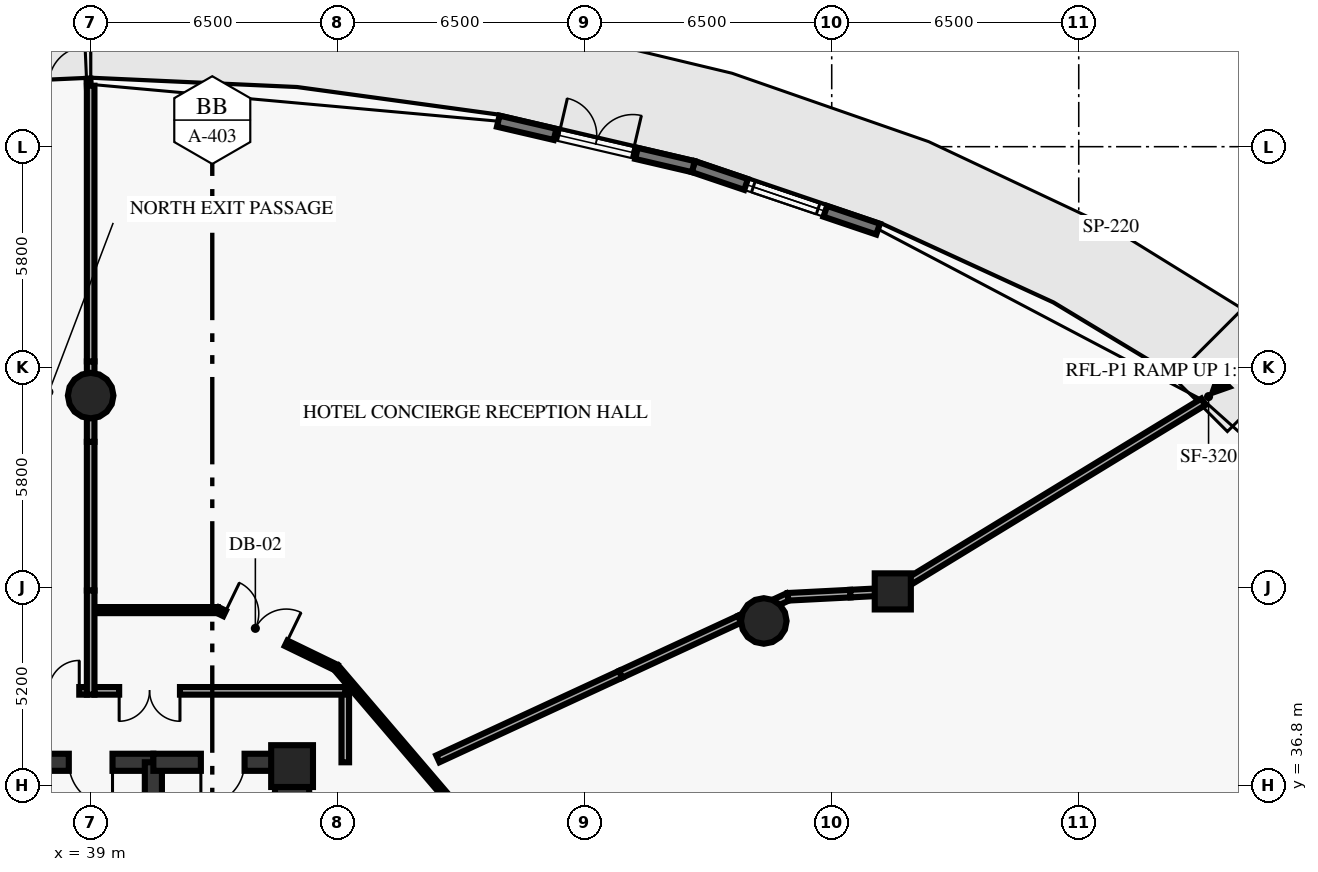
"""IFC4 building model, lengths in metres.
Left out: names, types, materials, properties, quantities, classifications, styles, units other than length and angle.
Written with IfcOpenShell. Run it as: python <this file> out.ifc"""

import sys

from ifc_helpers import new_model, si_unit, direction, frame, frame_2d, origin, origin_2d, place, context, subcontext, project, spatial, rectangle, circle, extrude, element, fill, save


model = new_model("IFC4")
c1 = context("Model", 3, precision=1e-05, world=origin(), true_north=direction((0.0, 1.0)))
c2 = subcontext(c1, "Body", "Model", "MODEL_VIEW")
j1 = project(units=[si_unit("LENGTHUNIT", "METRE"), si_unit("PLANEANGLEUNIT", "RADIAN")], contexts=[c1])
p1 = place(None, origin())
s1 = spatial("IfcSite", under=j1, at=p1, CompositionType="ELEMENT")
p2 = place(p1, origin())
s2 = spatial("IfcBuilding", under=s1, at=p2, CompositionType="ELEMENT")
p3 = place(p2, origin())
s3 = spatial("IfcBuildingStorey", under=s2, at=p3, CompositionType="ELEMENT", Elevation=0.0)
p4 = place(p3, frame((44.3, 37.3, 0.0), z_axis=(0.0, 0.0, 1.0), x_axis=(1.0, 0.0, 0.0)))
e1 = element("IfcColumn", 1, at=p4, inside=s3, PredefinedType="PILASTER", context=c2, shape_type="SweptSolid", body=[
    extrude(rectangle(XDim=1.1, YDim=1.1, at=origin_2d()), origin(), (0.0, 0.0, 1.0), 5.7),
])
for number, where, z_axis, x_axis in (
    (2, (56.713, 41.119, 0.0), (0.0, 0.0, 1.0), (1.0, 0.0, 0.0)),
    (3, (39.0, 47.05, 0.0), (0.0, 0.0, 1.0), (1.0, 0.0, 0.0)),
):
    element("IfcColumn", number, at=place(p3, frame(where, z_axis=z_axis, x_axis=x_axis)), inside=s3, PredefinedType="COLUMN", context=c2, shape_type="SweptSolid", body=[
        extrude(circle(Radius=0.6, at=origin_2d()), origin(), (0.0, 0.0, 1.0), 5.7),
    ])
p5 = place(p3, frame((60.107, 41.897, 0.0), z_axis=(0.0, 0.0, 1.0), x_axis=(1.0, 0.0, 0.0)))
e4 = element("IfcColumn", 4, at=p5, inside=s3, PredefinedType="COLUMN", context=c2, shape_type="SweptSolid", body=[
    extrude(rectangle(XDim=0.95, YDim=0.95, at=origin_2d()), origin(), (0.0, 0.0, 1.0), 5.7),
])
p6 = place(p3, frame((44.3, 29.05, 0.0), z_axis=(0.0, 0.0, 1.0), x_axis=(0.0, 1.0, 0.0)))
e5 = element("IfcWall", 5, at=p6, inside=s3, PredefinedType="SHEAR", context=c2, shape_type="SweptSolid", body=[
    extrude(rectangle(XDim=8.35, YDim=0.9, at=frame_2d((4.175, 0.0))), origin(), (0.0, 0.0, 1.0), 5.7),
])
p7 = place(p3, frame((54.858, 53.075, 0.0), z_axis=(0.0, 0.0, 1.0), x_axis=(0.947251518608, -0.320491123895, 0.0)))
e6 = element("IfcWall", 6, at=p7, inside=s3, PredefinedType="STANDARD", context=c2, shape_type="SweptSolid", body=[
    extrude(rectangle(XDim=5.133, YDim=0.3, at=frame_2d((2.566, 0.0))), origin(), (0.0, 0.0, 1.0), 5.7),
])
p8 = place(p7, frame((1.666, 0.0, 0.9)))
e7 = element("IfcOpeningElement", 7, at=p8, cuts=e6, PredefinedType="OPENING", context=c2, shape_type="SweptSolid", body=[
    extrude(rectangle(XDim=1.8, YDim=2.4, at=frame_2d((0.9, 1.2))), frame((0.0, 0.16, 0.0), z_axis=(0.0, -1.0, 0.0), x_axis=(1.0, 0.0, 0.0)), (0.0, 0.0, 1.0), 0.32),
])
p9 = place(p7, frame((1.466, 0.0, 3.4)))
e8 = element("IfcOpeningElement", 8, at=p9, cuts=e6, PredefinedType="OPENING", context=c2, shape_type="SweptSolid", body=[
    extrude(rectangle(XDim=2.2, YDim=1.3, at=frame_2d((1.1, 0.65))), frame((0.0, 0.16, 0.0), z_axis=(0.0, -1.0, 0.0), x_axis=(1.0, 0.0, 0.0)), (0.0, 0.0, 1.0), 0.32),
])
p10 = place(p3, frame((49.725, 54.271, 0.0), z_axis=(0.0, 0.0, 1.0), x_axis=(0.973908821588, -0.226939655487, 0.0)))
e9 = element("IfcWall", 9, at=p10, inside=s3, PredefinedType="STANDARD", context=c2, shape_type="SweptSolid", body=[
    extrude(rectangle(XDim=5.27, YDim=0.3, at=frame_2d((2.635, 0.0))), origin(), (0.0, 0.0, 1.0), 5.7),
])
p11 = place(p10, frame((1.635, 0.0, 0.0)))
e10 = element("IfcOpeningElement", 10, at=p11, cuts=e9, PredefinedType="OPENING", context=c2, shape_type="SweptSolid", body=[
    extrude(rectangle(XDim=2.0, YDim=2.4, at=frame_2d((1.0, 1.2))), frame((0.0, 0.16, 0.0), z_axis=(0.0, -1.0, 0.0), x_axis=(1.0, 0.0, 0.0)), (0.0, 0.0, 1.0), 0.32),
])
p12 = place(p10, frame((1.535, 0.0, 3.4)))
e11 = element("IfcOpeningElement", 11, at=p12, cuts=e9, PredefinedType="OPENING", context=c2, shape_type="SweptSolid", body=[
    extrude(rectangle(XDim=2.2, YDim=1.3, at=frame_2d((1.1, 0.65))), frame((0.0, 0.16, 0.0), z_axis=(0.0, -1.0, 0.0), x_axis=(1.0, 0.0, 0.0)), (0.0, 0.0, 1.0), 0.32),
])
p13 = place(p3, frame((33.591, 54.997, 0.0), z_axis=(0.0, 0.0, 1.0), x_axis=(0.998993030562, 0.044865631479, 0.0)))
e12 = element("IfcWall", 12, at=p13, inside=s3, PredefinedType="STANDARD", context=c2, shape_type="SweptSolid", body=[
    extrude(rectangle(XDim=5.414, YDim=0.3, at=frame_2d((2.707, 0.0))), origin(), (0.0, 0.0, 1.0), 5.7),
])
p14 = place(p13, frame((0.9, 0.0, 0.9)))
e13 = element("IfcOpeningElement", 13, at=p14, cuts=e12, PredefinedType="OPENING", context=c2, shape_type="SweptSolid", body=[
    extrude(rectangle(XDim=1.8, YDim=2.4, at=frame_2d((0.9, 1.2))), frame((0.0, 0.16, 0.0), z_axis=(0.0, -1.0, 0.0), x_axis=(1.0, 0.0, 0.0)), (0.0, 0.0, 1.0), 0.32),
])
p15 = place(p13, frame((3.312, 0.0, 0.0)))
e14 = element("IfcOpeningElement", 14, at=p15, cuts=e12, PredefinedType="OPENING", context=c2, shape_type="SweptSolid", body=[
    extrude(rectangle(XDim=2.0, YDim=2.4, at=frame_2d((1.0, 1.2))), frame((0.0, 0.16, 0.0), z_axis=(0.0, -1.0, 0.0), x_axis=(1.0, 0.0, 0.0)), (0.0, 0.0, 1.0), 0.32),
])
p16 = place(p13, frame((1.607, 0.0, 3.4)))
e15 = element("IfcOpeningElement", 15, at=p16, cuts=e12, PredefinedType="OPENING", context=c2, shape_type="SweptSolid", body=[
    extrude(rectangle(XDim=2.2, YDim=1.3, at=frame_2d((1.1, 0.65))), frame((0.0, 0.16, 0.0), z_axis=(0.0, -1.0, 0.0), x_axis=(1.0, 0.0, 0.0)), (0.0, 0.0, 1.0), 0.32),
])
p17 = place(p3, frame((37.35, 37.4, 0.0), z_axis=(0.0, 0.0, 1.0), x_axis=(1.0, 0.0, 0.0)))
e16 = element("IfcWall", 16, at=p17, inside=s3, PredefinedType="SHEAR", context=c2, shape_type="SweptSolid", body=[
    extrude(rectangle(XDim=3.3, YDim=0.45, at=frame_2d((1.65, 0.0))), origin(), (0.0, 0.0, 1.0), 5.7),
])
p18 = place(p17, frame((1.075, 0.0, 0.0)))
e17 = element("IfcOpeningElement", 17, at=p18, cuts=e16, PredefinedType="OPENING", context=c2, shape_type="SweptSolid", body=[
    extrude(rectangle(XDim=1.15, YDim=2.15, at=frame_2d((0.575, 1.075))), frame((0.0, 0.235, 0.0), z_axis=(0.0, -1.0, 0.0), x_axis=(1.0, 0.0, 0.0)), (0.0, 0.0, 1.0), 0.47),
])
p19 = place(p3, frame((40.65, 29.05, 0.0), z_axis=(0.0, 0.0, 1.0), x_axis=(0.0, 1.0, 0.0)))
e18 = element("IfcWall", 18, at=p19, inside=s3, PredefinedType="SHEAR", context=c2, shape_type="SweptSolid", body=[
    extrude(rectangle(XDim=8.35, YDim=0.45, at=frame_2d((4.175, 0.0))), origin(), (0.0, 0.0, 1.0), 5.7),
])
p20 = place(p3, frame((40.65, 37.4, 0.0), z_axis=(0.0, 0.0, 1.0), x_axis=(1.0, 0.0, 0.0)))
e19 = element("IfcWall", 19, at=p20, inside=s3, PredefinedType="SHEAR", context=c2, shape_type="SweptSolid", body=[
    extrude(rectangle(XDim=3.65, YDim=0.45, at=frame_2d((1.825, 0.0))), origin(), (0.0, 0.0, 1.0), 5.7),
])
p21 = place(p20, frame((1.25, 0.0, 0.0)))
e20 = element("IfcOpeningElement", 20, at=p21, cuts=e19, PredefinedType="OPENING", context=c2, shape_type="SweptSolid", body=[
    extrude(rectangle(XDim=1.15, YDim=2.15, at=frame_2d((0.575, 1.075))), frame((0.0, 0.235, 0.0), z_axis=(0.0, -1.0, 0.0), x_axis=(1.0, 0.0, 0.0)), (0.0, 0.0, 1.0), 0.47),
])
p22 = place(p3, frame((45.7, 37.4, 0.0), z_axis=(0.0, 0.0, 1.0), x_axis=(0.0, 1.0, 0.0)))
e21 = element("IfcWall", 21, at=p22, inside=s3, PredefinedType="SOLIDWALL", context=c2, shape_type="SweptSolid", body=[
    extrude(rectangle(XDim=1.88, YDim=0.2, at=frame_2d((0.94, 0.0))), origin(), (0.0, 0.0, 1.0), 5.7),
])
p23 = place(p3, frame((33.7, 39.28, 0.0), z_axis=(0.0, 0.0, 1.0), x_axis=(1.0, 0.0, 0.0)))
e22 = element("IfcWall", 22, at=p23, inside=s3, PredefinedType="SOLIDWALL", context=c2, shape_type="SweptSolid", body=[
    extrude(rectangle(XDim=5.2, YDim=0.2, at=frame_2d((2.6, 0.0))), origin(), (0.0, 0.0, 1.0), 5.7),
])
p24 = place(p23, frame((1.25, 0.0, 0.0)))
e23 = element("IfcOpeningElement", 23, at=p24, cuts=e22, PredefinedType="OPENING", context=c2, shape_type="SweptSolid", body=[
    extrude(rectangle(XDim=1.6, YDim=2.2, at=frame_2d((0.8, 1.1))), frame((0.0, 0.11, 0.0), z_axis=(0.0, -1.0, 0.0), x_axis=(1.0, 0.0, 0.0)), (0.0, 0.0, 1.0), 0.22),
])
p25 = place(p23, frame((3.4, 0.0, 0.0)))
e24 = element("IfcOpeningElement", 24, at=p25, cuts=e22, PredefinedType="OPENING", context=c2, shape_type="SweptSolid", body=[
    extrude(rectangle(XDim=1.6, YDim=2.2, at=frame_2d((0.8, 1.1))), frame((0.0, 0.11, 0.0), z_axis=(0.0, -1.0, 0.0), x_axis=(1.0, 0.0, 0.0)), (0.0, 0.0, 1.0), 0.22),
])
p26 = place(p3, frame((39.1, 39.28, 0.0), z_axis=(0.0, 0.0, 1.0), x_axis=(1.0, 0.0, 0.0)))
e25 = element("IfcWall", 25, at=p26, inside=s3, PredefinedType="SOLIDWALL", context=c2, shape_type="SweptSolid", body=[
    extrude(rectangle(XDim=6.6, YDim=0.2, at=frame_2d((3.3, 0.0))), origin(), (0.0, 0.0, 1.0), 5.7),
])
p27 = place(p26, frame((0.65, 0.0, 0.0)))
e26 = element("IfcOpeningElement", 26, at=p27, cuts=e25, PredefinedType="OPENING", context=c2, shape_type="SweptSolid", body=[
    extrude(rectangle(XDim=1.6, YDim=2.2, at=frame_2d((0.8, 1.1))), frame((0.0, 0.11, 0.0), z_axis=(0.0, -1.0, 0.0), x_axis=(1.0, 0.0, 0.0)), (0.0, 0.0, 1.0), 0.22),
])
p28 = place(p3, frame((50.189, 34.36, 0.0), z_axis=(0.0, 0.0, 1.0), x_axis=(-0.649652680018, 0.760231145998, 0.0)))
e27 = element("IfcWall", 27, at=p28, inside=s3, PredefinedType="PARTITIONING", context=c2, shape_type="SweptSolid", body=[
    extrude(rectangle(XDim=7.279, YDim=0.16, at=frame_2d((3.64, 0.0))), origin(), (0.0, 0.0, 1.0), 5.7),
])
p29 = place(p3, frame((42.344, 41.405, 0.0), z_axis=(0.0, 0.0, 1.0), x_axis=(0.899789784655, -0.436323668199, 0.0)))
e28 = element("IfcWall", 28, at=p29, inside=s3, PredefinedType="PARTITIONING", context=c2, shape_type="SweptSolid", body=[
    extrude(rectangle(XDim=3.463, YDim=0.16, at=frame_2d((1.731, 0.0))), origin(), (0.0, 0.0, 1.0), 5.7),
])
p30 = place(p29, frame((0.2, 0.0, 0.0)))
e29 = element("IfcOpeningElement", 29, at=p30, cuts=e28, PredefinedType="OPENING", context=c2, shape_type="SweptSolid", body=[
    extrude(rectangle(XDim=1.8, YDim=2.3, at=frame_2d((0.9, 1.15))), frame((0.0, 0.09, 0.0), z_axis=(0.0, -1.0, 0.0), x_axis=(1.0, 0.0, 0.0)), (0.0, 0.0, 1.0), 0.18),
])
p31 = place(p3, frame((48.136, 37.491, 0.0), z_axis=(0.0, 0.0, 1.0), x_axis=(0.907524785669, 0.419998527851, 0.0)))
e30 = element("IfcWall", 30, at=p31, inside=s3, PredefinedType="PARTITIONING", context=c2, shape_type="SweptSolid", body=[
    extrude(rectangle(XDim=5.3, YDim=0.2, at=frame_2d((2.65, 0.0))), origin(), (0.0, 0.0, 1.0), 5.7),
])
p32 = place(p3, frame((52.946, 39.717, 0.0), z_axis=(0.0, 0.0, 1.0), x_axis=(0.90747190463, 0.420112773321, 0.0)))
e31 = element("IfcWall", 31, at=p32, inside=s3, PredefinedType="PARTITIONING", context=c2, shape_type="SweptSolid", body=[
    extrude(rectangle(XDim=3.449, YDim=0.2, at=frame_2d((1.725, 0.0))), origin(), (0.0, 0.0, 1.0), 4.92),
])
p33 = place(p3, frame((56.076, 41.166, 0.0), z_axis=(0.0, 0.0, 1.0), x_axis=(0.907622896373, 0.419786467124, 0.0)))
e32 = element("IfcWall", 32, at=p33, inside=s3, PredefinedType="PARTITIONING", context=c2, shape_type="SweptSolid", body=[
    extrude(rectangle(XDim=1.403, YDim=0.2, at=frame_2d((0.701, 0.0))), origin(), (0.0, 0.0, 1.0), 5.7),
])
p34 = place(p3, frame((57.349, 41.755, 0.0), z_axis=(0.0, 0.0, 1.0), x_axis=(0.998685128887, 0.051264152576, 0.0)))
e33 = element("IfcWall", 33, at=p34, inside=s3, PredefinedType="PARTITIONING", context=c2, shape_type="SweptSolid", body=[
    extrude(rectangle(XDim=1.643, YDim=0.2, at=frame_2d((0.822, 0.0))), origin(), (0.0, 0.0, 1.0), 5.7),
])
p35 = place(p3, frame((58.99, 41.839, 0.0), z_axis=(0.0, 0.0, 1.0), x_axis=(0.998660904733, 0.051733909163, 0.0)))
e34 = element("IfcWall", 34, at=p35, inside=s3, PredefinedType="PARTITIONING", context=c2, shape_type="SweptSolid", body=[
    extrude(rectangle(XDim=1.118, YDim=0.2, at=frame_2d((0.559, 0.0))), origin(), (0.0, 0.0, 1.0), 5.24),
])
p36 = place(p3, frame((60.107, 41.897, 0.0), z_axis=(0.0, 0.0, 1.0), x_axis=(0.853534520774, 0.521036296093, 0.0)))
e35 = element("IfcWall", 35, at=p36, inside=s3, PredefinedType="PARTITIONING", context=c2, shape_type="SweptSolid", body=[
    extrude(rectangle(XDim=9.573, YDim=0.2, at=frame_2d((4.787, 0.0))), origin(), (0.0, 0.0, 1.0), 5.7),
])
p37 = place(p3, frame((39.0, 41.92, 0.0), z_axis=(0.0, 0.0, 1.0), x_axis=(0.0, 1.0, 0.0)))
e36 = element("IfcWall", 36, at=p37, inside=s3, PredefinedType="PARTITIONING", context=c2, shape_type="SweptSolid", body=[
    extrude(rectangle(XDim=3.913, YDim=0.2, at=frame_2d((1.957, 0.0))), origin(), (0.0, 0.0, 1.0), 5.7),
])
p38 = place(p3, frame((39.0, 45.833, 0.0), z_axis=(0.0, 0.0, 1.0), x_axis=(0.0, 1.0, 0.0)))
e37 = element("IfcWall", 37, at=p38, inside=s3, PredefinedType="PARTITIONING", context=c2, shape_type="SweptSolid", body=[
    extrude(rectangle(XDim=1.234, YDim=0.2, at=frame_2d((0.617, 0.0))), origin(), (0.0, 0.0, 1.0), 5.165),
])
p39 = place(p3, frame((39.0, 47.067, 0.0), z_axis=(0.0, 0.0, 1.0), x_axis=(0.0, 1.0, 0.0)))
e38 = element("IfcWall", 38, at=p39, inside=s3, PredefinedType="PARTITIONING", context=c2, shape_type="SweptSolid", body=[
    extrude(rectangle(XDim=0.883, YDim=0.2, at=frame_2d((0.441, 0.0))), origin(), (0.0, 0.0, 1.0), 5.7),
])
p40 = place(p3, frame((39.0, 47.95, 0.0), z_axis=(0.0, 0.0, 1.0), x_axis=(0.0, 1.0, 0.0)))
e39 = element("IfcWall", 39, at=p40, inside=s3, PredefinedType="PARTITIONING", context=c2, shape_type="SweptSolid", body=[
    extrude(rectangle(XDim=7.255, YDim=0.2, at=frame_2d((3.627, 0.0))), origin(), (0.0, 0.0, 1.0), 5.7),
])
p41 = place(p3, frame((42.344, 41.405, 0.0), z_axis=(0.0, 0.0, 1.0), x_axis=(-1.0, 0.0, 0.0)))
e40 = element("IfcWall", 40, at=p41, inside=s3, PredefinedType="PARTITIONING", context=c2, shape_type="SweptSolid", body=[
    extrude(rectangle(XDim=3.344, YDim=0.16, at=frame_2d((1.672, 0.0))), origin(), (0.0, 0.0, 1.0), 5.7),
])
p42 = place(p3, frame((39.0, 39.18, 0.0), z_axis=(0.0, 0.0, 1.0), x_axis=(0.0, 1.0, 0.0)))
e41 = element("IfcWall", 41, at=p42, inside=s3, PredefinedType="SOLIDWALL", context=c2, shape_type="SweptSolid", body=[
    extrude(rectangle(XDim=2.74, YDim=0.2, at=frame_2d((1.37, 0.0))), origin(), (0.0, 0.0, 1.0), 5.7),
])
p43 = place(p8, origin())
e42 = element("IfcWindow", 42, at=p43, inside=s3, PartitioningType="DOUBLE_PANEL_VERTICAL", PredefinedType="WINDOW", context=c2, shape_type="SweptSolid", body=[
    extrude(rectangle(XDim=1.8, YDim=2.4, at=frame_2d((0.9, 1.2))), frame((0.0, 0.03, 0.0), z_axis=(0.0, -1.0, 0.0), x_axis=(1.0, 0.0, 0.0)), (0.0, 0.0, 1.0), 0.06),
])
fill(e7, e42)
p44 = place(p9, origin())
e43 = element("IfcWindow", 43, at=p44, inside=s3, PartitioningType="DOUBLE_PANEL_HORIZONTAL", PredefinedType="WINDOW", context=c2, shape_type="SweptSolid", body=[
    extrude(rectangle(XDim=2.2, YDim=1.3, at=frame_2d((1.1, 0.65))), frame((0.0, 0.03, 0.0), z_axis=(0.0, -1.0, 0.0), x_axis=(1.0, 0.0, 0.0)), (0.0, 0.0, 1.0), 0.06),
])
fill(e8, e43)
p45 = place(p11, origin())
e44 = element("IfcDoor", 44, at=p45, inside=s3, OperationType="DOUBLE_DOOR_SINGLE_SWING", PredefinedType="DOOR", context=c2, shape_type="SweptSolid", body=[
    extrude(rectangle(XDim=2.0, YDim=2.4, at=frame_2d((1.0, 1.2))), frame((0.0, 0.025, 0.0), z_axis=(0.0, -1.0, 0.0), x_axis=(1.0, 0.0, 0.0)), (0.0, 0.0, 1.0), 0.05),
])
fill(e10, e44)
p46 = place(p12, origin())
e45 = element("IfcWindow", 45, at=p46, inside=s3, PartitioningType="DOUBLE_PANEL_HORIZONTAL", PredefinedType="WINDOW", context=c2, shape_type="SweptSolid", body=[
    extrude(rectangle(XDim=2.2, YDim=1.3, at=frame_2d((1.1, 0.65))), frame((0.0, 0.03, 0.0), z_axis=(0.0, -1.0, 0.0), x_axis=(1.0, 0.0, 0.0)), (0.0, 0.0, 1.0), 0.06),
])
fill(e11, e45)
p47 = place(p15, origin())
e46 = element("IfcDoor", 46, at=p47, inside=s3, OperationType="DOUBLE_DOOR_SINGLE_SWING", PredefinedType="DOOR", context=c2, shape_type="SweptSolid", body=[
    extrude(rectangle(XDim=2.0, YDim=2.4, at=frame_2d((1.0, 1.2))), frame((0.0, 0.025, 0.0), z_axis=(0.0, -1.0, 0.0), x_axis=(1.0, 0.0, 0.0)), (0.0, 0.0, 1.0), 0.05),
])
fill(e14, e46)
p48 = place(p18, origin())
e47 = element("IfcDoor", 47, at=p48, inside=s3, OperationType="SINGLE_SWING_RIGHT", PredefinedType="DOOR", context=c2, shape_type="SweptSolid", body=[
    extrude(rectangle(XDim=1.15, YDim=2.15, at=frame_2d((0.575, 1.075))), frame((0.0, 0.025, 0.0), z_axis=(0.0, -1.0, 0.0), x_axis=(1.0, 0.0, 0.0)), (0.0, 0.0, 1.0), 0.05),
])
fill(e17, e47)
p49 = place(p21, origin())
e48 = element("IfcDoor", 48, at=p49, inside=s3, OperationType="SINGLE_SWING_LEFT", PredefinedType="DOOR", context=c2, shape_type="SweptSolid", body=[
    extrude(rectangle(XDim=1.15, YDim=2.15, at=frame_2d((0.575, 1.075))), frame((0.0, 0.025, 0.0), z_axis=(0.0, -1.0, 0.0), x_axis=(1.0, 0.0, 0.0)), (0.0, 0.0, 1.0), 0.05),
])
fill(e20, e48)
p50 = place(p25, origin())
e49 = element("IfcDoor", 49, at=p50, inside=s3, OperationType="DOUBLE_DOOR_SINGLE_SWING", PredefinedType="DOOR", context=c2, shape_type="SweptSolid", body=[
    extrude(rectangle(XDim=1.6, YDim=2.2, at=frame_2d((0.8, 1.1))), frame((0.0, 0.025, 0.0), z_axis=(0.0, -1.0, 0.0), x_axis=(1.0, 0.0, 0.0)), (0.0, 0.0, 1.0), 0.05),
])
fill(e24, e49)
p51 = place(p27, origin())
e50 = element("IfcDoor", 50, at=p51, inside=s3, OperationType="DOUBLE_DOOR_SINGLE_SWING", PredefinedType="DOOR", context=c2, shape_type="SweptSolid", body=[
    extrude(rectangle(XDim=1.6, YDim=2.2, at=frame_2d((0.8, 1.1))), frame((0.0, 0.025, 0.0), z_axis=(0.0, -1.0, 0.0), x_axis=(1.0, 0.0, 0.0)), (0.0, 0.0, 1.0), 0.05),
])
fill(e26, e50)
p52 = place(p30, origin())
e51 = element("IfcDoor", 51, at=p52, inside=s3, OperationType="DOUBLE_DOOR_SINGLE_SWING", PredefinedType="DOOR", context=c2, shape_type="SweptSolid", body=[
    extrude(rectangle(XDim=1.8, YDim=2.3, at=frame_2d((0.9, 1.15))), frame((0.0, 0.025, 0.0), z_axis=(0.0, -1.0, 0.0), x_axis=(1.0, 0.0, 0.0)), (0.0, 0.0, 1.0), 0.05),
])
fill(e29, e51)
save(model, sys.argv[1])
